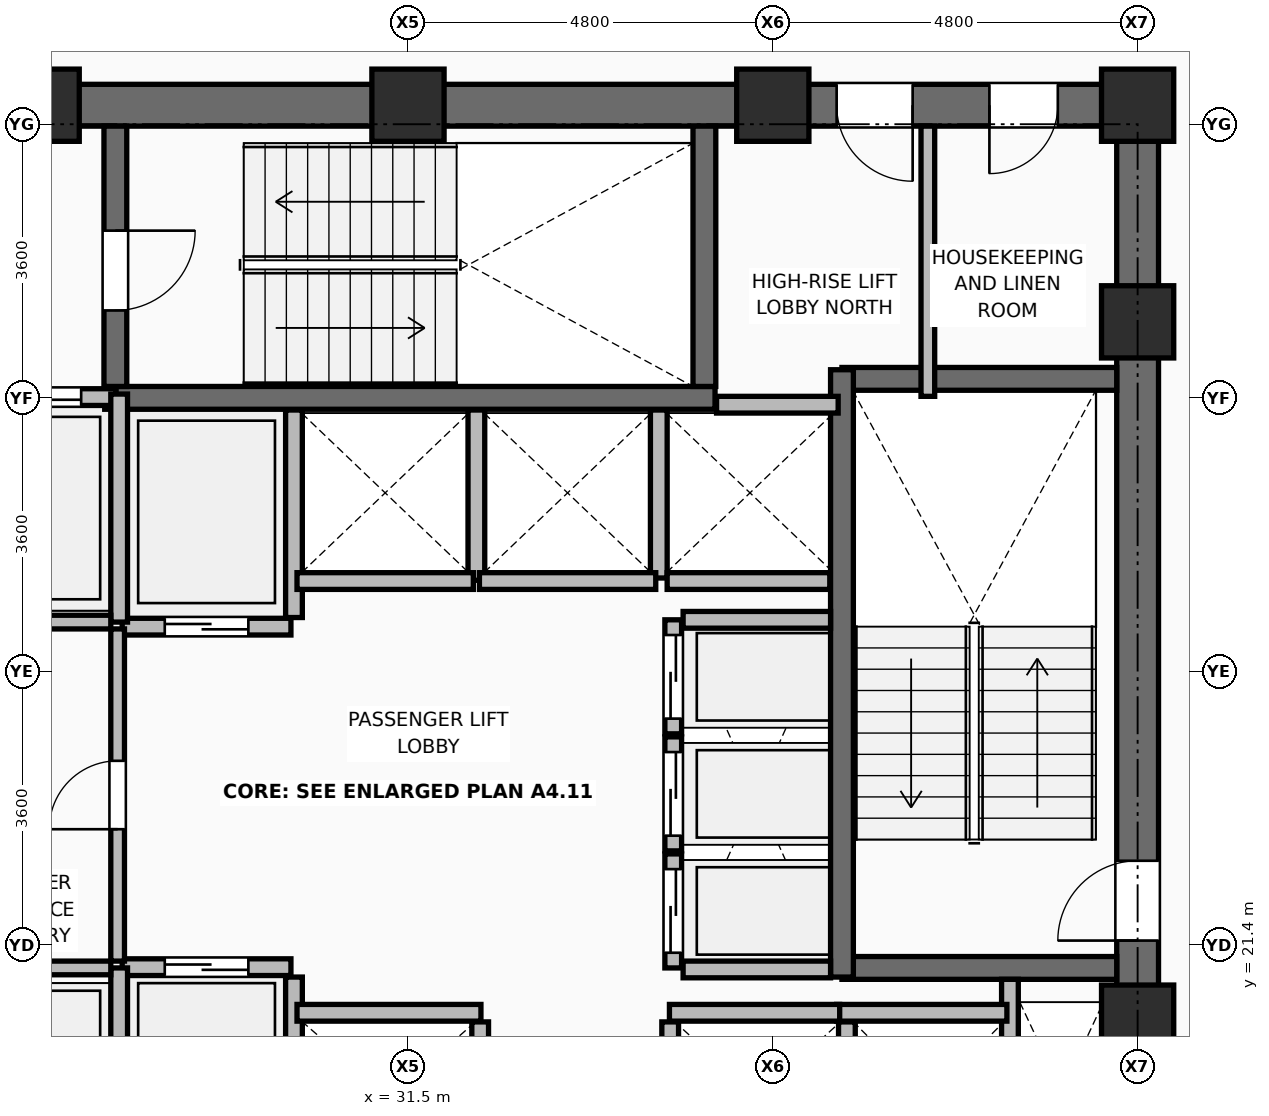
"""IFC4 building model, lengths in metres.
Left out: names, types, materials, properties, quantities, classifications, styles, units other than length and angle.
Written with IfcOpenShell. Run it as: python <this file> out.ifc"""

import sys

from ifc_helpers import new_model, si_unit, direction, frame, frame_2d, origin, origin_2d, place, context, subcontext, project, spatial, rectangle, extrude, element, fill, save


model = new_model("IFC4")
c1 = context("Model", 3, precision=1e-05, world=origin(), true_north=direction((0.0, 1.0)))
c2 = subcontext(c1, "Body", "Model", "MODEL_VIEW")
j1 = project(units=[si_unit("LENGTHUNIT", "METRE"), si_unit("PLANEANGLEUNIT", "RADIAN")], contexts=[c1])
p1 = place(None, origin())
s1 = spatial("IfcSite", under=j1, at=p1, CompositionType="ELEMENT")
p2 = place(p1, origin())
s2 = spatial("IfcBuilding", under=s1, at=p2, CompositionType="ELEMENT")
p3 = place(p2, frame((0.0, 0.0, 160.95)))
s3 = spatial("IfcBuildingStorey", under=s2, at=p3, CompositionType="ELEMENT", Elevation=160.95)
for number, where, z_axis, x_axis in (
    (1, (41.1, 20.4, 0.0), (0.0, 0.0, 1.0), (1.0, 0.0, 0.0)),
    (2, (41.1, 29.6, 0.0), (0.0, 0.0, 1.0), (1.0, 0.0, 0.0)),
    (3, (26.7, 32.45, 0.0), (0.0, 0.0, 1.0), (1.0, 0.0, 0.0)),
    (4, (31.5, 32.45, 0.0), (0.0, 0.0, 1.0), (1.0, 0.0, 0.0)),
    (5, (36.3, 32.45, 0.0), (0.0, 0.0, 1.0), (1.0, 0.0, 0.0)),
    (6, (41.1, 32.45, 0.0), (0.0, 0.0, 1.0), (1.0, 0.0, 0.0)),
):
    element("IfcColumn", number, at=place(p3, frame(where, z_axis=z_axis, x_axis=x_axis)), inside=s3, PredefinedType="COLUMN", context=c2, shape_type="SweptSolid", body=[
        extrude(rectangle(XDim=0.95, YDim=0.95, at=origin_2d()), origin(), (0.0, 0.0, 1.0), 3.75),
    ])
p4 = place(p3, frame((30.0, 18.08, 0.0), z_axis=(0.0, 0.0, 1.0), x_axis=(0.0, 1.0, 0.0)))
e7 = element("IfcWall", 7, at=p4, inside=s3, PredefinedType="PARTITIONING", context=c2, shape_type="SweptSolid", body=[
    extrude(rectangle(XDim=2.9, YDim=0.22, at=frame_2d((1.45, 0.0))), origin(), (0.0, 0.0, 1.0), 3.545),
])
for number, where, z_axis, x_axis in (
    (8, (32.45, 17.92, 0.0), (0.0, 0.0, 1.0), (0.0, 1.0, 0.0)),
    (9, (34.95, 17.92, 0.0), (0.0, 0.0, 1.0), (0.0, 1.0, 0.0)),
):
    element("IfcWall", number, at=place(p3, frame(where, z_axis=z_axis, x_axis=x_axis)), inside=s3, PredefinedType="PARTITIONING", context=c2, shape_type="SweptSolid", body=[
        extrude(rectangle(XDim=2.47, YDim=0.22, at=frame_2d((1.235, 0.0))), origin(), (0.0, 0.0, 1.0), 3.006),
    ])
p5 = place(p3, frame((37.275, 18.08, 0.0), z_axis=(0.0, 0.0, 1.0), x_axis=(0.0, 1.0, 0.0)))
e10 = element("IfcWall", 10, at=p5, inside=s3, PredefinedType="PARTITIONING", context=c2, shape_type="SweptSolid", body=[
    extrude(rectangle(XDim=2.31, YDim=0.22, at=frame_2d((1.155, 0.0))), origin(), (0.0, 0.0, 1.0), 3.545),
])
p6 = place(p3, frame((30.0, 25.71, 0.0), z_axis=(0.0, 0.0, 1.0), x_axis=(0.0, 1.0, 0.0)))
e11 = element("IfcWall", 11, at=p6, inside=s3, PredefinedType="PARTITIONING", context=c2, shape_type="SweptSolid", body=[
    extrude(rectangle(XDim=2.73, YDim=0.22, at=frame_2d((1.365, 0.0))), origin(), (0.0, 0.0, 1.0), 3.545),
])
p7 = place(p3, frame((32.4, 26.2, 0.0), z_axis=(0.0, 0.0, 1.0), x_axis=(0.0, 1.0, 0.0)))
e12 = element("IfcWall", 12, at=p7, inside=s3, PredefinedType="PARTITIONING", context=c2, shape_type="SweptSolid", body=[
    extrude(rectangle(XDim=2.24, YDim=0.22, at=frame_2d((1.12, 0.0))), origin(), (0.0, 0.0, 1.0), 3.545),
])
p8 = place(p3, frame((34.8, 26.23, 0.0), z_axis=(0.0, 0.0, 1.0), x_axis=(0.0, 1.0, 0.0)))
e13 = element("IfcWall", 13, at=p8, inside=s3, PredefinedType="PARTITIONING", context=c2, shape_type="SweptSolid", body=[
    extrude(rectangle(XDim=2.21, YDim=0.22, at=frame_2d((1.105, 0.0))), origin(), (0.0, 0.0, 1.0), 3.545),
])
p9 = place(p3, frame((34.91, 26.19, 0.0), z_axis=(0.0, 0.0, 1.0), x_axis=(1.0, 0.0, 0.0)))
e14 = element("IfcWall", 14, at=p9, inside=s3, PredefinedType="PARTITIONING", context=c2, shape_type="SweptSolid", body=[
    extrude(rectangle(XDim=2.14, YDim=0.22, at=frame_2d((1.07, 0.0))), origin(), (0.0, 0.0, 1.0), 3.545),
])
p10 = place(p3, frame((21.625, 32.45, 0.0), z_axis=(0.0, 0.0, 1.0), x_axis=(1.0, 0.0, 0.0)))
e15 = element("IfcWall", 15, at=p10, inside=s3, PredefinedType="SHEAR", context=c2, shape_type="SweptSolid", body=[
    extrude(rectangle(XDim=19.75, YDim=0.55, at=frame_2d((9.875, 0.0))), origin(), (0.0, 0.0, 1.0), 3.57),
])
p11 = place(p10, frame((2.125, 0.0, 0.0)))
e16 = element("IfcOpeningElement", 16, at=p11, cuts=e15, PredefinedType="OPENING", context=c2, shape_type="SweptSolid", body=[
    extrude(rectangle(XDim=1.1, YDim=2.1, at=frame_2d((0.55, 1.05))), frame((0.0, 0.285, 0.0), z_axis=(0.0, -1.0, 0.0), x_axis=(1.0, 0.0, 0.0)), (0.0, 0.0, 1.0), 0.57),
])
p12 = place(p10, frame((15.515, 0.0, 0.0)))
e17 = element("IfcOpeningElement", 17, at=p12, cuts=e15, PredefinedType="OPENING", context=c2, shape_type="SweptSolid", body=[
    extrude(rectangle(XDim=1.0, YDim=2.1, at=frame_2d((0.5, 1.05))), frame((0.0, 0.285, 0.0), z_axis=(0.0, -1.0, 0.0), x_axis=(1.0, 0.0, 0.0)), (0.0, 0.0, 1.0), 0.57),
])
p13 = place(p10, frame((17.525, 0.0, 0.0)))
e18 = element("IfcOpeningElement", 18, at=p13, cuts=e15, PredefinedType="OPENING", context=c2, shape_type="SweptSolid", body=[
    extrude(rectangle(XDim=0.9, YDim=2.1, at=frame_2d((0.45, 1.05))), frame((0.0, 0.285, 0.0), z_axis=(0.0, -1.0, 0.0), x_axis=(1.0, 0.0, 0.0)), (0.0, 0.0, 1.0), 0.57),
])
p14 = place(p3, frame((41.1, 18.075, 0.0), z_axis=(0.0, 0.0, 1.0), x_axis=(0.0, 1.0, 0.0)))
e19 = element("IfcWall", 19, at=p14, inside=s3, PredefinedType="SHEAR", context=c2, shape_type="SweptSolid", body=[
    extrude(rectangle(XDim=14.1, YDim=0.55, at=frame_2d((7.05, 0.0))), origin(), (0.0, 0.0, 1.0), 3.57),
])
p15 = place(p14, frame((3.385, 0.0, 0.0)))
e20 = element("IfcOpeningElement", 20, at=p15, cuts=e19, PredefinedType="OPENING", context=c2, shape_type="SweptSolid", body=[
    extrude(rectangle(XDim=1.05, YDim=2.1, at=frame_2d((0.525, 1.05))), frame((0.0, 0.285, 0.0), z_axis=(0.0, -1.0, 0.0), x_axis=(1.0, 0.0, 0.0)), (0.0, 0.0, 1.0), 0.57),
])
for number, where, z_axis, x_axis in (
    (21, (37.21, 21.1, 0.0), (0.0, 0.0, 1.0), (1.0, 0.0, 0.0)),
    (22, (37.21, 28.85, 0.0), (0.0, 0.0, 1.0), (1.0, 0.0, 0.0)),
):
    element("IfcWall", number, at=place(p3, frame(where, z_axis=z_axis, x_axis=x_axis)), inside=s3, PredefinedType="SHEAR", context=c2, shape_type="SweptSolid", body=[
        extrude(rectangle(XDim=3.615, YDim=0.3, at=frame_2d((1.808, 0.0))), origin(), (0.0, 0.0, 1.0), 3.57),
    ])
p16 = place(p3, frame((37.21, 20.98, 0.0), z_axis=(0.0, 0.0, 1.0), x_axis=(0.0, 1.0, 0.0)))
e23 = element("IfcWall", 23, at=p16, inside=s3, PredefinedType="SHEAR", context=c2, shape_type="SweptSolid", body=[
    extrude(rectangle(XDim=7.99, YDim=0.3, at=frame_2d((3.995, 0.0))), origin(), (0.0, 0.0, 1.0), 3.57),
])
p17 = place(p3, frame((27.51, 28.6, 0.0), z_axis=(0.0, 0.0, 1.0), x_axis=(1.0, 0.0, 0.0)))
e24 = element("IfcWall", 24, at=p17, inside=s3, PredefinedType="SHEAR", context=c2, shape_type="SweptSolid", body=[
    extrude(rectangle(XDim=8.03, YDim=0.3, at=frame_2d((4.015, 0.0))), origin(), (0.0, 0.0, 1.0), 3.57),
])
p18 = place(p3, frame((27.65, 28.75, 0.0), z_axis=(0.0, 0.0, 1.0), x_axis=(0.0, 1.0, 0.0)))
e25 = element("IfcWall", 25, at=p18, inside=s3, PredefinedType="SHEAR", context=c2, shape_type="SweptSolid", body=[
    extrude(rectangle(XDim=3.425, YDim=0.3, at=frame_2d((1.712, 0.0))), origin(), (0.0, 0.0, 1.0), 3.57),
])
p19 = place(p18, frame((1.0, 0.0, 0.0)))
e26 = element("IfcOpeningElement", 26, at=p19, cuts=e25, PredefinedType="OPENING", context=c2, shape_type="SweptSolid", body=[
    extrude(rectangle(XDim=1.05, YDim=2.1, at=frame_2d((0.525, 1.05))), frame((0.0, 0.16, 0.0), z_axis=(0.0, -1.0, 0.0), x_axis=(1.0, 0.0, 0.0)), (0.0, 0.0, 1.0), 0.32),
])
p20 = place(p3, frame((35.4, 28.75, 0.0), z_axis=(0.0, 0.0, 1.0), x_axis=(0.0, 1.0, 0.0)))
e27 = element("IfcWall", 27, at=p20, inside=s3, PredefinedType="SHEAR", context=c2, shape_type="SweptSolid", body=[
    extrude(rectangle(XDim=3.425, YDim=0.3, at=frame_2d((1.712, 0.0))), origin(), (0.0, 0.0, 1.0), 3.57),
])
p21 = place(p3, frame((39.42, 18.075, 0.0), z_axis=(0.0, 0.0, 1.0), x_axis=(0.0, 1.0, 0.0)))
e28 = element("IfcWall", 28, at=p21, inside=s3, PredefinedType="PARTITIONING", context=c2, shape_type="SweptSolid", body=[
    extrude(rectangle(XDim=2.875, YDim=0.22, at=frame_2d((1.438, 0.0))), origin(), (0.0, 0.0, 1.0), 3.55),
])
p22 = place(p3, frame((25.64, 28.61, 0.0), z_axis=(0.0, 0.0, 1.0), x_axis=(1.0, 0.0, 0.0)))
e29 = element("IfcWall", 29, at=p22, inside=s3, PredefinedType="PARTITIONING", context=c2, shape_type="SweptSolid", body=[
    extrude(rectangle(XDim=2.02, YDim=0.22, at=frame_2d((1.01, 0.0))), origin(), (0.0, 0.0, 1.0), 3.55),
])
p23 = place(p22, frame((0.46, 0.0, 0.0)))
e30 = element("IfcOpeningElement", 30, at=p23, cuts=e29, PredefinedType="OPENING", context=c2, shape_type="SweptSolid", body=[
    extrude(rectangle(XDim=1.1, YDim=2.2, at=frame_2d((0.55, 1.1))), frame((0.0, 0.12, 0.0), z_axis=(0.0, -1.0, 0.0), x_axis=(1.0, 0.0, 0.0)), (0.0, 0.0, 1.0), 0.24),
])
p24 = place(p3, frame((27.74, 21.11, 0.0), z_axis=(0.0, 0.0, 1.0), x_axis=(1.0, 0.0, 0.0)))
e31 = element("IfcWall", 31, at=p24, inside=s3, PredefinedType="PARTITIONING", context=c2, shape_type="SweptSolid", body=[
    extrude(rectangle(XDim=2.22, YDim=0.22, at=frame_2d((1.11, 0.0))), origin(), (0.0, 0.0, 1.0), 3.55),
])
p25 = place(p24, frame((0.56, 0.0, 0.0)))
e32 = element("IfcOpeningElement", 32, at=p25, cuts=e31, PredefinedType="OPENING", context=c2, shape_type="SweptSolid", body=[
    extrude(rectangle(XDim=1.1, YDim=2.2, at=frame_2d((0.55, 1.1))), frame((0.0, 0.12, 0.0), z_axis=(0.0, -1.0, 0.0), x_axis=(1.0, 0.0, 0.0)), (0.0, 0.0, 1.0), 0.24),
])
p26 = place(p3, frame((27.74, 25.59, 0.0), z_axis=(0.0, 0.0, 1.0), x_axis=(1.0, 0.0, 0.0)))
e33 = element("IfcWall", 33, at=p26, inside=s3, PredefinedType="PARTITIONING", context=c2, shape_type="SweptSolid", body=[
    extrude(rectangle(XDim=2.22, YDim=0.22, at=frame_2d((1.11, 0.0))), origin(), (0.0, 0.0, 1.0), 3.55),
])
p27 = place(p26, frame((0.56, 0.0, 0.0)))
e34 = element("IfcOpeningElement", 34, at=p27, cuts=e33, PredefinedType="OPENING", context=c2, shape_type="SweptSolid", body=[
    extrude(rectangle(XDim=1.1, YDim=2.2, at=frame_2d((0.55, 1.1))), frame((0.0, 0.12, 0.0), z_axis=(0.0, -1.0, 0.0), x_axis=(1.0, 0.0, 0.0)), (0.0, 0.0, 1.0), 0.24),
])
p28 = place(p3, frame((30.04, 20.51, 0.0), z_axis=(0.0, 0.0, 1.0), x_axis=(1.0, 0.0, 0.0)))
e35 = element("IfcWall", 35, at=p28, inside=s3, PredefinedType="PARTITIONING", context=c2, shape_type="SweptSolid", body=[
    extrude(rectangle(XDim=2.42, YDim=0.22, at=frame_2d((1.21, 0.0))), origin(), (0.0, 0.0, 1.0), 3.55),
])
for number, where, z_axis, x_axis in (
    (36, (37.14, 20.51, 0.0), (0.0, 0.0, 1.0), (1.0, 0.0, 0.0)),
    (37, (34.94, 20.51, 0.0), (0.0, 0.0, 1.0), (1.0, 0.0, 0.0)),
):
    element("IfcWall", number, at=place(p3, frame(where, z_axis=z_axis, x_axis=x_axis)), inside=s3, PredefinedType="PARTITIONING", context=c2, shape_type="SweptSolid", body=[
        extrude(rectangle(XDim=2.24, YDim=0.22, at=frame_2d((1.12, 0.0))), origin(), (0.0, 0.0, 1.0), 3.55),
    ])
for number, where, z_axis, x_axis in (
    (38, (30.04, 26.19, 0.0), (0.0, 0.0, 1.0), (1.0, 0.0, 0.0)),
    (39, (32.44, 26.19, 0.0), (0.0, 0.0, 1.0), (1.0, 0.0, 0.0)),
):
    element("IfcWall", number, at=place(p3, frame(where, z_axis=z_axis, x_axis=x_axis)), inside=s3, PredefinedType="PARTITIONING", context=c2, shape_type="SweptSolid", body=[
        extrude(rectangle(XDim=2.32, YDim=0.22, at=frame_2d((1.16, 0.0))), origin(), (0.0, 0.0, 1.0), 3.55),
    ])
p29 = place(p3, frame((35.56, 28.51, 0.0), z_axis=(0.0, 0.0, 1.0), x_axis=(1.0, 0.0, 0.0)))
e40 = element("IfcWall", 40, at=p29, inside=s3, PredefinedType="PARTITIONING", context=c2, shape_type="SweptSolid", body=[
    extrude(rectangle(XDim=1.6, YDim=0.22, at=frame_2d((0.8, 0.0))), origin(), (0.0, 0.0, 1.0), 3.55),
])
p30 = place(p3, frame((34.99, 21.1, 0.0), z_axis=(0.0, 0.0, 1.0), x_axis=(0.0, 1.0, 0.0)))
e41 = element("IfcWall", 41, at=p30, inside=s3, PredefinedType="PARTITIONING", context=c2, shape_type="SweptSolid", body=[
    extrude(rectangle(XDim=1.5, YDim=0.22, at=frame_2d((0.75, 0.0))), origin(), (0.0, 0.0, 1.0), 3.55),
])
p31 = place(p30, frame((0.2, 0.0, 0.0)))
e42 = element("IfcOpeningElement", 42, at=p31, cuts=e41, PredefinedType="OPENING", context=c2, shape_type="SweptSolid", body=[
    extrude(rectangle(XDim=1.1, YDim=2.2, at=frame_2d((0.55, 1.1))), frame((0.0, 0.12, 0.0), z_axis=(0.0, -1.0, 0.0), x_axis=(1.0, 0.0, 0.0)), (0.0, 0.0, 1.0), 0.24),
])
p32 = place(p3, frame((34.99, 22.64, 0.0), z_axis=(0.0, 0.0, 1.0), x_axis=(0.0, 1.0, 0.0)))
e43 = element("IfcWall", 43, at=p32, inside=s3, PredefinedType="PARTITIONING", context=c2, shape_type="SweptSolid", body=[
    extrude(rectangle(XDim=1.5, YDim=0.22, at=frame_2d((0.75, 0.0))), origin(), (0.0, 0.0, 1.0), 3.55),
])
p33 = place(p32, frame((0.2, 0.0, 0.0)))
e44 = element("IfcOpeningElement", 44, at=p33, cuts=e43, PredefinedType="OPENING", context=c2, shape_type="SweptSolid", body=[
    extrude(rectangle(XDim=1.1, YDim=2.2, at=frame_2d((0.55, 1.1))), frame((0.0, 0.12, 0.0), z_axis=(0.0, -1.0, 0.0), x_axis=(1.0, 0.0, 0.0)), (0.0, 0.0, 1.0), 0.24),
])
p34 = place(p3, frame((34.99, 24.18, 0.0), z_axis=(0.0, 0.0, 1.0), x_axis=(0.0, 1.0, 0.0)))
e45 = element("IfcWall", 45, at=p34, inside=s3, PredefinedType="PARTITIONING", context=c2, shape_type="SweptSolid", body=[
    extrude(rectangle(XDim=1.5, YDim=0.22, at=frame_2d((0.75, 0.0))), origin(), (0.0, 0.0, 1.0), 3.55),
])
p35 = place(p34, frame((0.2, 0.0, 0.0)))
e46 = element("IfcOpeningElement", 46, at=p35, cuts=e45, PredefinedType="OPENING", context=c2, shape_type="SweptSolid", body=[
    extrude(rectangle(XDim=1.1, YDim=2.2, at=frame_2d((0.55, 1.1))), frame((0.0, 0.12, 0.0), z_axis=(0.0, -1.0, 0.0), x_axis=(1.0, 0.0, 0.0)), (0.0, 0.0, 1.0), 0.24),
])
p36 = place(p3, frame((27.7, 18.15, 0.0), z_axis=(0.0, 0.0, 1.0), x_axis=(0.0, 1.0, 0.0)))
e47 = element("IfcWall", 47, at=p36, inside=s3, PredefinedType="PARTITIONING", context=c2, shape_type="SweptSolid", body=[
    extrude(rectangle(XDim=2.95, YDim=0.22, at=frame_2d((1.475, 0.0))), origin(), (0.0, 0.0, 1.0), 3.55),
])
p37 = place(p3, frame((27.7, 25.65, 0.0), z_axis=(0.0, 0.0, 1.0), x_axis=(0.0, 1.0, 0.0)))
e48 = element("IfcWall", 48, at=p37, inside=s3, PredefinedType="PARTITIONING", context=c2, shape_type="SweptSolid", body=[
    extrude(rectangle(XDim=3.0, YDim=0.22, at=frame_2d((1.5, 0.0))), origin(), (0.0, 0.0, 1.0), 3.55),
])
for number, where, z_axis, x_axis in (
    (49, (35.12, 21.08, 0.0), (0.0, 0.0, 1.0), (1.0, 0.0, 0.0)),
    (50, (35.12, 25.68, 0.0), (0.0, 0.0, 1.0), (1.0, 0.0, 0.0)),
):
    element("IfcWall", number, at=place(p3, frame(where, z_axis=z_axis, x_axis=x_axis)), inside=s3, PredefinedType="PARTITIONING", context=c2, shape_type="SweptSolid", body=[
        extrude(rectangle(XDim=1.94, YDim=0.22, at=frame_2d((0.97, 0.0))), origin(), (0.0, 0.0, 1.0), 3.55),
    ])
for number, where, z_axis, x_axis in (
    (51, (25.89, 21.1, 0.0), (0.0, 0.0, 1.0), (1.0, 0.0, 0.0)),
    (52, (25.89, 25.65, 0.0), (0.0, 0.0, 1.0), (1.0, 0.0, 0.0)),
):
    element("IfcWall", number, at=place(p3, frame(where, z_axis=z_axis, x_axis=x_axis)), inside=s3, PredefinedType="PARTITIONING", context=c2, shape_type="SweptSolid", body=[
        extrude(rectangle(XDim=1.7, YDim=0.18, at=frame_2d((0.85, 0.0))), origin(), (0.0, 0.0, 1.0), 3.55),
    ])
p38 = place(p3, frame((27.68, 21.19, 0.0), z_axis=(0.0, 0.0, 1.0), x_axis=(0.0, 1.0, 0.0)))
e53 = element("IfcWall", 53, at=p38, inside=s3, PredefinedType="PARTITIONING", context=c2, shape_type="SweptSolid", body=[
    extrude(rectangle(XDim=4.37, YDim=0.18, at=frame_2d((2.185, 0.0))), origin(), (0.0, 0.0, 1.0), 3.55),
])
p39 = place(p38, frame((1.735, 0.0, 0.0)))
e54 = element("IfcOpeningElement", 54, at=p39, cuts=e53, PredefinedType="OPENING", context=c2, shape_type="SweptSolid", body=[
    extrude(rectangle(XDim=0.9, YDim=2.1, at=frame_2d((0.45, 1.05))), frame((0.0, 0.1, 0.0), z_axis=(0.0, -1.0, 0.0), x_axis=(1.0, 0.0, 0.0)), (0.0, 0.0, 1.0), 0.2),
])
p40 = place(p3, frame((38.34, 28.62, 0.0), z_axis=(0.0, 0.0, 1.0), x_axis=(0.0, 1.0, 0.0)))
e55 = element("IfcWall", 55, at=p40, inside=s3, PredefinedType="PARTITIONING", context=c2, shape_type="SweptSolid", body=[
    extrude(rectangle(XDim=3.555, YDim=0.18, at=frame_2d((1.777, 0.0))), origin(), (0.0, 0.0, 1.0), 3.55),
])
p41 = place(p15, origin())
e56 = element("IfcDoor", 56, at=p41, inside=s3, OperationType="SINGLE_SWING_LEFT", PredefinedType="DOOR", context=c2, shape_type="SweptSolid", body=[
    extrude(rectangle(XDim=1.05, YDim=2.1, at=frame_2d((0.525, 1.05))), frame((0.0, 0.025, 0.0), z_axis=(0.0, -1.0, 0.0), x_axis=(1.0, 0.0, 0.0)), (0.0, 0.0, 1.0), 0.05),
])
fill(e20, e56)
p42 = place(p19, frame((1.05, 0.0, 0.0), z_axis=(0.0, 0.0, 1.0), x_axis=(-1.0, 0.0, 0.0)))
e57 = element("IfcDoor", 57, at=p42, inside=s3, OperationType="SINGLE_SWING_LEFT", PredefinedType="DOOR", context=c2, shape_type="SweptSolid", body=[
    extrude(rectangle(XDim=1.05, YDim=2.1, at=frame_2d((0.525, 1.05))), frame((0.0, 0.025, 0.0), z_axis=(0.0, -1.0, 0.0), x_axis=(1.0, 0.0, 0.0)), (0.0, 0.0, 1.0), 0.05),
])
fill(e26, e57)
p43 = place(p23, origin())
e58 = element("IfcDoor", 58, at=p43, inside=s3, OperationType="DOUBLE_DOOR_SLIDING", PredefinedType="DOOR", context=c2, shape_type="SweptSolid", body=[
    extrude(rectangle(XDim=1.1, YDim=2.2, at=frame_2d((0.55, 1.1))), frame((0.0, 0.025, 0.0), z_axis=(0.0, -1.0, 0.0), x_axis=(1.0, 0.0, 0.0)), (0.0, 0.0, 1.0), 0.05),
])
fill(e30, e58)
p44 = place(p25, origin())
e59 = element("IfcDoor", 59, at=p44, inside=s3, OperationType="DOUBLE_DOOR_SLIDING", PredefinedType="DOOR", context=c2, shape_type="SweptSolid", body=[
    extrude(rectangle(XDim=1.1, YDim=2.2, at=frame_2d((0.55, 1.1))), frame((0.0, 0.025, 0.0), z_axis=(0.0, -1.0, 0.0), x_axis=(1.0, 0.0, 0.0)), (0.0, 0.0, 1.0), 0.05),
])
fill(e32, e59)
p45 = place(p27, frame((1.1, 0.0, 0.0), z_axis=(0.0, 0.0, 1.0), x_axis=(-1.0, 0.0, 0.0)))
e60 = element("IfcDoor", 60, at=p45, inside=s3, OperationType="DOUBLE_DOOR_SLIDING", PredefinedType="DOOR", context=c2, shape_type="SweptSolid", body=[
    extrude(rectangle(XDim=1.1, YDim=2.2, at=frame_2d((0.55, 1.1))), frame((0.0, 0.025, 0.0), z_axis=(0.0, -1.0, 0.0), x_axis=(1.0, 0.0, 0.0)), (0.0, 0.0, 1.0), 0.05),
])
fill(e34, e60)
p46 = place(p31, origin())
e61 = element("IfcDoor", 61, at=p46, inside=s3, OperationType="DOUBLE_DOOR_SLIDING", PredefinedType="DOOR", context=c2, shape_type="SweptSolid", body=[
    extrude(rectangle(XDim=1.1, YDim=2.2, at=frame_2d((0.55, 1.1))), frame((0.0, 0.025, 0.0), z_axis=(0.0, -1.0, 0.0), x_axis=(1.0, 0.0, 0.0)), (0.0, 0.0, 1.0), 0.05),
])
fill(e42, e61)
p47 = place(p33, origin())
e62 = element("IfcDoor", 62, at=p47, inside=s3, OperationType="DOUBLE_DOOR_SLIDING", PredefinedType="DOOR", context=c2, shape_type="SweptSolid", body=[
    extrude(rectangle(XDim=1.1, YDim=2.2, at=frame_2d((0.55, 1.1))), frame((0.0, 0.025, 0.0), z_axis=(0.0, -1.0, 0.0), x_axis=(1.0, 0.0, 0.0)), (0.0, 0.0, 1.0), 0.05),
])
fill(e44, e62)
p48 = place(p35, origin())
e63 = element("IfcDoor", 63, at=p48, inside=s3, OperationType="DOUBLE_DOOR_SLIDING", PredefinedType="DOOR", context=c2, shape_type="SweptSolid", body=[
    extrude(rectangle(XDim=1.1, YDim=2.2, at=frame_2d((0.55, 1.1))), frame((0.0, 0.025, 0.0), z_axis=(0.0, -1.0, 0.0), x_axis=(1.0, 0.0, 0.0)), (0.0, 0.0, 1.0), 0.05),
])
fill(e46, e63)
p49 = place(p39, origin())
e64 = element("IfcDoor", 64, at=p49, inside=s3, OperationType="SINGLE_SWING_LEFT", PredefinedType="DOOR", context=c2, shape_type="SweptSolid", body=[
    extrude(rectangle(XDim=0.9, YDim=2.1, at=frame_2d((0.45, 1.05))), frame((0.0, 0.025, 0.0), z_axis=(0.0, -1.0, 0.0), x_axis=(1.0, 0.0, 0.0)), (0.0, 0.0, 1.0), 0.05),
])
fill(e54, e64)
p50 = place(p12, frame((1.0, 0.0, 0.0), z_axis=(0.0, 0.0, 1.0), x_axis=(-1.0, 0.0, 0.0)))
e65 = element("IfcDoor", 65, at=p50, inside=s3, OperationType="SINGLE_SWING_LEFT", PredefinedType="DOOR", context=c2, shape_type="SweptSolid", body=[
    extrude(rectangle(XDim=1.0, YDim=2.1, at=frame_2d((0.5, 1.05))), frame((0.0, 0.025, 0.0), z_axis=(0.0, -1.0, 0.0), x_axis=(1.0, 0.0, 0.0)), (0.0, 0.0, 1.0), 0.05),
])
fill(e17, e65)
p51 = place(p13, frame((0.9, 0.0, 0.0), z_axis=(0.0, 0.0, 1.0), x_axis=(-1.0, 0.0, 0.0)))
e66 = element("IfcDoor", 66, at=p51, inside=s3, OperationType="SINGLE_SWING_RIGHT", PredefinedType="DOOR", context=c2, shape_type="SweptSolid", body=[
    extrude(rectangle(XDim=0.9, YDim=2.1, at=frame_2d((0.45, 1.05))), frame((0.0, 0.025, 0.0), z_axis=(0.0, -1.0, 0.0), x_axis=(1.0, 0.0, 0.0)), (0.0, 0.0, 1.0), 0.05),
])
fill(e18, e66)
save(model, sys.argv[1])
